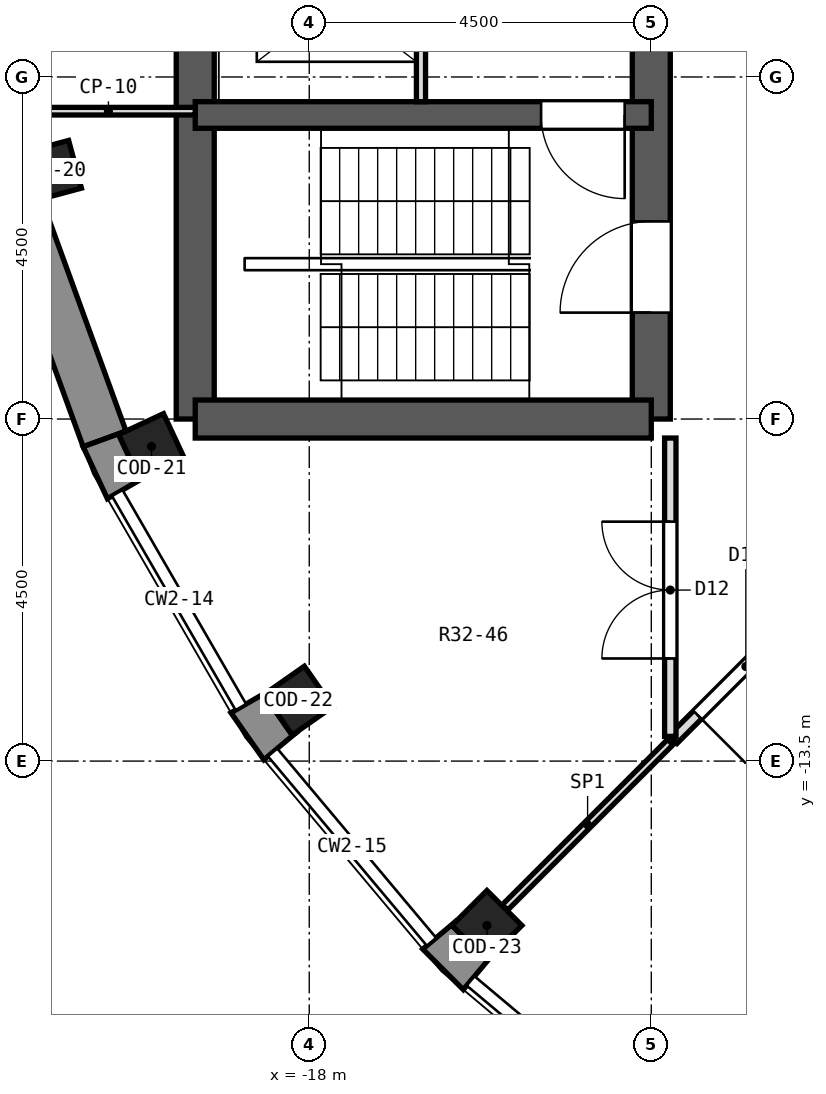
"""IFC4 building model, lengths in metres.
Left out: names, types, materials, properties, quantities, classifications, styles, units other than length and angle.
Written with IfcOpenShell. Run it as: python <this file> out.ifc"""

import sys

from ifc_helpers import new_model, si_unit, direction, frame, frame_2d, origin, origin_2d, place, context, subcontext, project, spatial, polyline, rectangle, outline, extrude, element, fill, save


model = new_model("IFC4")
c1 = context("Model", 3, precision=1e-05, world=origin(), true_north=direction((0.0, 1.0)))
c2 = subcontext(c1, "Body", "Model", "MODEL_VIEW")
j1 = project(units=[si_unit("LENGTHUNIT", "METRE"), si_unit("PLANEANGLEUNIT", "RADIAN")], contexts=[c1])
p1 = place(None, origin())
s1 = spatial("IfcSite", under=j1, at=p1, CompositionType="ELEMENT")
p2 = place(p1, origin())
s2 = spatial("IfcBuilding", under=s1, at=p2, CompositionType="ELEMENT")
p3 = place(p2, frame((0.0, 0.0, 224.7)))
s3 = spatial("IfcBuildingStorey", under=s2, at=p3, CompositionType="ELEMENT", Elevation=224.7)
for number, where, z_axis, x_axis in (
    (1, (-21.395, -5.733, -0.55), (0.0, 0.0, 1.0), (-0.966, -0.259, 0.0)),
    (2, (-20.075, -9.361, -0.55), (0.0, 0.0, 1.0), (-0.906, -0.423, 0.0)),
    (3, (-18.144, -12.705, -0.55), (0.0, 0.0, 1.0), (-0.819, -0.574, 0.0)),
    (4, (-15.662, -15.662, -0.55), (0.0, 0.0, 1.0), (-0.707, -0.707, 0.0)),
):
    element("IfcColumn", number, at=place(p3, frame(where, z_axis=z_axis, x_axis=x_axis)), inside=s3, PredefinedType="COLUMN", context=c2, shape_type="SweptSolid", body=[
        extrude(rectangle(XDim=0.65, YDim=0.65, at=origin_2d()), origin(), (0.0, 0.0, 1.0), 5.55),
    ])
p4 = place(p3, frame((-13.5, -9.0, 0.0), z_axis=(0.0, 0.0, 1.0), x_axis=(0.0, 1.0, 0.0)))
e5 = element("IfcWall", 5, at=p4, inside=s3, PredefinedType="SHEAR", context=c2, shape_type="SweptSolid", body=[
    extrude(rectangle(XDim=18.0, YDim=0.5, at=frame_2d((9.0, 0.0))), origin(), (0.0, 0.0, 1.0), 5.0),
])
p5 = place(p4, frame((15.4, 0.0, 0.0)))
e6 = element("IfcOpeningElement", 6, at=p5, cuts=e5, PredefinedType="OPENING", context=c2, shape_type="SweptSolid", body=[
    extrude(rectangle(XDim=1.2, YDim=2.1, at=frame_2d((0.6, 1.05))), frame((0.0, 0.262, 0.0), z_axis=(0.0, -1.0, 0.0), x_axis=(1.0, 0.0, 0.0)), (0.0, 0.0, 1.0), 0.524),
])
p6 = place(p4, frame((1.4, 0.0, 0.0)))
e7 = element("IfcOpeningElement", 7, at=p6, cuts=e5, PredefinedType="OPENING", context=c2, shape_type="SweptSolid", body=[
    extrude(rectangle(XDim=1.2, YDim=2.1, at=frame_2d((0.6, 1.05))), frame((0.0, 0.262, 0.0), z_axis=(0.0, -1.0, 0.0), x_axis=(1.0, 0.0, 0.0)), (0.0, 0.0, 1.0), 0.524),
])
p7 = place(p4, frame((7.5, 0.0, 0.0)))
e8 = element("IfcOpeningElement", 8, at=p7, cuts=e5, PredefinedType="OPENING", context=c2, shape_type="SweptSolid", body=[
    extrude(rectangle(XDim=3.0, YDim=2.4, at=frame_2d((1.5, 1.2))), frame((0.0, 0.262, 0.0), z_axis=(0.0, -1.0, 0.0), x_axis=(1.0, 0.0, 0.0)), (0.0, 0.0, 1.0), 0.524),
])
p8 = place(p3, frame((-19.5, -9.0, 0.0), z_axis=(0.0, 0.0, 1.0), x_axis=(0.0, 1.0, 0.0)))
e9 = element("IfcWall", 9, at=p8, inside=s3, PredefinedType="SHEAR", context=c2, shape_type="SweptSolid", body=[
    extrude(rectangle(XDim=18.0, YDim=0.5, at=frame_2d((9.0, 0.0))), origin(), (0.0, 0.0, 1.0), 5.0),
])
p9 = place(p8, frame((9.45, 0.0, 0.0)))
e10 = element("IfcOpeningElement", 10, at=p9, cuts=e9, PredefinedType="OPENING", context=c2, shape_type="SweptSolid", body=[
    extrude(rectangle(XDim=0.9, YDim=2.1, at=frame_2d((0.45, 1.05))), frame((0.0, 0.262, 0.0), z_axis=(0.0, -1.0, 0.0), x_axis=(1.0, 0.0, 0.0)), (0.0, 0.0, 1.0), 0.524),
])
p10 = place(p8, frame((7.65, 0.0, 0.0)))
e11 = element("IfcOpeningElement", 11, at=p10, cuts=e9, PredefinedType="OPENING", context=c2, shape_type="SweptSolid", body=[
    extrude(rectangle(XDim=0.9, YDim=2.1, at=frame_2d((0.45, 1.05))), frame((0.0, 0.262, 0.0), z_axis=(0.0, -1.0, 0.0), x_axis=(1.0, 0.0, 0.0)), (0.0, 0.0, 1.0), 0.524),
])
p11 = place(p3, frame((-13.5, -9.0, 0.0), z_axis=(0.0, 0.0, 1.0), x_axis=(-1.0, 0.0, 0.0)))
e12 = element("IfcWall", 12, at=p11, inside=s3, PredefinedType="SHEAR", context=c2, shape_type="SweptSolid", body=[
    extrude(rectangle(XDim=6.0, YDim=0.5, at=frame_2d((3.0, 0.0))), origin(), (0.0, 0.0, 1.0), 5.0),
])
p12 = place(p3, frame((-13.5, -5.0, 0.0), z_axis=(0.0, 0.0, 1.0), x_axis=(-1.0, 0.0, 0.0)))
e13 = element("IfcWall", 13, at=p12, inside=s3, PredefinedType="SHEAR", context=c2, shape_type="SweptSolid", body=[
    extrude(rectangle(XDim=6.0, YDim=0.35, at=frame_2d((3.0, 0.0))), origin(), (0.0, 0.0, 1.0), 5.0),
])
p13 = place(p12, frame((0.35, 0.0, 0.0)))
e14 = element("IfcOpeningElement", 14, at=p13, cuts=e13, PredefinedType="OPENING", context=c2, shape_type="SweptSolid", body=[
    extrude(rectangle(XDim=1.1, YDim=2.1, at=frame_2d((0.55, 1.05))), frame((0.0, 0.187, 0.0), z_axis=(0.0, -1.0, 0.0), x_axis=(1.0, 0.0, 0.0)), (0.0, 0.0, 1.0), 0.374),
])
p14 = place(p3, frame((-21.805, -6.206, 0.0), z_axis=(0.0, 0.0, 1.0), x_axis=(0.342056509473, -0.939679383794, 0.0)))
e15 = element("IfcWall", 15, at=p14, inside=s3, PredefinedType="SOLIDWALL", context=c2, shape_type="SweptSolid", body=[
    extrude(rectangle(XDim=3.252, YDim=0.6, at=frame_2d((1.626, 0.0))), origin(), (0.0, 0.0, 1.0), 4.6),
])
p15 = place(p3, origin())
e16 = element("IfcWall", 16, at=p15, inside=s3, PredefinedType="SOLIDWALL", context=c2, shape_type="SweptSolid", body=[
    extrude(outline(polyline([(-20.975, -9.364), (-20.656, -10.048), (-20.136, -9.748), (-20.232, -9.793), (-20.507, -9.204), (-20.411, -9.159), (-20.975, -9.364)])), origin(), (0.0, 0.0, 1.0), 4.6),
])
p16 = place(p3, origin())
e17 = element("IfcWall", 17, at=p16, inside=s3, PredefinedType="SOLIDWALL", context=c2, shape_type="SweptSolid", body=[
    extrude(outline(polyline([(-19.03, -12.864), (-18.597, -13.482), (-18.137, -13.097), (-18.224, -13.157), (-18.597, -12.625), (-18.51, -12.564), (-19.03, -12.864)])), origin(), (0.0, 0.0, 1.0), 4.6),
])
p17 = place(p3, origin())
e18 = element("IfcWall", 18, at=p17, inside=s3, PredefinedType="SOLIDWALL", context=c2, shape_type="SweptSolid", body=[
    extrude(outline(polyline([(-15.973, -16.507), (-15.588, -16.047), (-15.662, -16.122), (-16.122, -15.662), (-16.047, -15.588), (-16.507, -15.973), (-15.973, -16.507)])), origin(), (0.0, 0.0, 1.0), 4.6),
])
p18 = place(p3, frame((-15.426, -15.426, 0.0), z_axis=(0.0, 0.0, 1.0), x_axis=(0.707106781187, 0.707106781187, 0.0)))
e19 = element("IfcWall", 19, at=p18, inside=s3, PredefinedType="PARTITIONING", context=c2, shape_type="SweptSolid", body=[
    extrude(rectangle(XDim=3.077, YDim=0.1, at=frame_2d((1.538, 0.0))), origin(), (0.0, 0.0, 1.0), 4.6),
])
p19 = place(p3, frame((-13.215, -13.215, 0.0), z_axis=(0.0, 0.0, 1.0), x_axis=(0.707106781187, 0.707106781187, 0.0)))
e20 = element("IfcWall", 20, at=p19, inside=s3, PredefinedType="PARTITIONING", context=c2, shape_type="SweptSolid", body=[
    extrude(rectangle(XDim=5.777, YDim=0.15, at=frame_2d((2.888, 0.0))), origin(), (0.0, 0.0, 1.0), 4.6),
])
p20 = place(p19, frame((3.859, 0.0, 0.0)))
e21 = element("IfcOpeningElement", 21, at=p20, cuts=e20, PredefinedType="OPENING", context=c2, shape_type="SweptSolid", body=[
    extrude(rectangle(XDim=0.9, YDim=2.1, at=frame_2d((0.45, 1.05))), frame((0.0, 0.087, 0.0), z_axis=(0.0, -1.0, 0.0), x_axis=(1.0, 0.0, 0.0)), (0.0, 0.0, 1.0), 0.174),
])
p21 = place(p19, frame((0.456, 0.0, 0.0)))
e22 = element("IfcOpeningElement", 22, at=p21, cuts=e20, PredefinedType="OPENING", context=c2, shape_type="SweptSolid", body=[
    extrude(rectangle(XDim=1.8, YDim=2.1, at=frame_2d((0.9, 1.05))), frame((0.0, 0.087, 0.0), z_axis=(0.0, -1.0, 0.0), x_axis=(1.0, 0.0, 0.0)), (0.0, 0.0, 1.0), 0.174),
])
p22 = place(p3, frame((-13.25, -13.175, 0.0), z_axis=(0.0, 0.0, 1.0), x_axis=(0.0, 1.0, 0.0)))
e23 = element("IfcWall", 23, at=p22, inside=s3, PredefinedType="PARTITIONING", context=c2, shape_type="SweptSolid", body=[
    extrude(rectangle(XDim=3.925, YDim=0.15, at=frame_2d((1.962, 0.0))), origin(), (0.0, 0.0, 1.0), 4.6),
])
p23 = place(p22, frame((1.025, 0.0, 0.0)))
e24 = element("IfcOpeningElement", 24, at=p23, cuts=e23, PredefinedType="OPENING", context=c2, shape_type="SweptSolid", body=[
    extrude(rectangle(XDim=1.8, YDim=2.1, at=frame_2d((0.9, 1.05))), frame((0.0, 0.087, 0.0), z_axis=(0.0, -1.0, 0.0), x_axis=(1.0, 0.0, 0.0)), (0.0, 0.0, 1.0), 0.174),
])
p24 = place(p3, frame((-19.5, -4.95, 0.0), z_axis=(0.0, 0.0, 1.0), x_axis=(-1.0, 0.0, 0.0)))
e25 = element("IfcWall", 25, at=p24, inside=s3, PredefinedType="PARTITIONING", context=c2, shape_type="SweptSolid", body=[
    extrude(rectangle(XDim=2.284, YDim=0.1, at=frame_2d((1.142, 0.0))), origin(), (0.0, 0.0, 1.0), 4.6),
])
p25 = place(p3, frame((-16.53, -4.825, 0.0), z_axis=(0.0, 0.0, 1.0), x_axis=(0.0, 1.0, 0.0)))
e26 = element("IfcWall", 26, at=p25, inside=s3, PredefinedType="PARTITIONING", context=c2, shape_type="SweptSolid", body=[
    extrude(rectangle(XDim=2.65, YDim=0.12, at=frame_2d((1.325, 0.0))), origin(), (0.0, 0.0, 1.0), 4.6),
])
p26 = place(p25, frame((0.775, 0.0, 0.0)))
e27 = element("IfcOpeningElement", 27, at=p26, cuts=e26, PredefinedType="OPENING", context=c2, shape_type="SweptSolid", body=[
    extrude(rectangle(XDim=1.1, YDim=2.1, at=frame_2d((0.55, 1.05))), frame((0.0, 0.072, 0.0), z_axis=(0.0, -1.0, 0.0), x_axis=(1.0, 0.0, 0.0)), (0.0, 0.0, 1.0), 0.144),
])
p27 = place(p23, origin())
e28 = element("IfcDoor", 28, at=p27, inside=s3, OperationType="DOUBLE_DOOR_SINGLE_SWING", PredefinedType="DOOR", context=c2, shape_type="SweptSolid", body=[
    extrude(rectangle(XDim=1.8, YDim=2.1, at=frame_2d((0.9, 1.05))), frame((0.0, 0.025, 0.0), z_axis=(0.0, -1.0, 0.0), x_axis=(1.0, 0.0, 0.0)), (0.0, 0.0, 1.0), 0.05),
])
fill(e24, e28)
p28 = place(p21, frame((1.8, 0.0, 0.0), z_axis=(0.0, 0.0, 1.0), x_axis=(-1.0, 0.0, 0.0)))
e29 = element("IfcDoor", 29, at=p28, inside=s3, OperationType="DOUBLE_DOOR_SINGLE_SWING", PredefinedType="DOOR", context=c2, shape_type="SweptSolid", body=[
    extrude(rectangle(XDim=1.8, YDim=2.1, at=frame_2d((0.9, 1.05))), frame((0.0, 0.025, 0.0), z_axis=(0.0, -1.0, 0.0), x_axis=(1.0, 0.0, 0.0)), (0.0, 0.0, 1.0), 0.05),
])
fill(e22, e29)
p29 = place(p13, origin())
e30 = element("IfcDoor", 30, at=p29, inside=s3, OperationType="SINGLE_SWING_LEFT", PredefinedType="DOOR", context=c2, shape_type="SweptSolid", body=[
    extrude(rectangle(XDim=1.1, YDim=2.1, at=frame_2d((0.55, 1.05))), frame((0.0, 0.025, 0.0), z_axis=(0.0, -1.0, 0.0), x_axis=(1.0, 0.0, 0.0)), (0.0, 0.0, 1.0), 0.05),
])
fill(e14, e30)
p30 = place(p6, origin())
e31 = element("IfcDoor", 31, at=p30, inside=s3, OperationType="SINGLE_SWING_LEFT", PredefinedType="DOOR", context=c2, shape_type="SweptSolid", body=[
    extrude(rectangle(XDim=1.2, YDim=2.1, at=frame_2d((0.6, 1.05))), frame((0.0, 0.025, 0.0), z_axis=(0.0, -1.0, 0.0), x_axis=(1.0, 0.0, 0.0)), (0.0, 0.0, 1.0), 0.05),
])
fill(e7, e31)
save(model, sys.argv[1])
